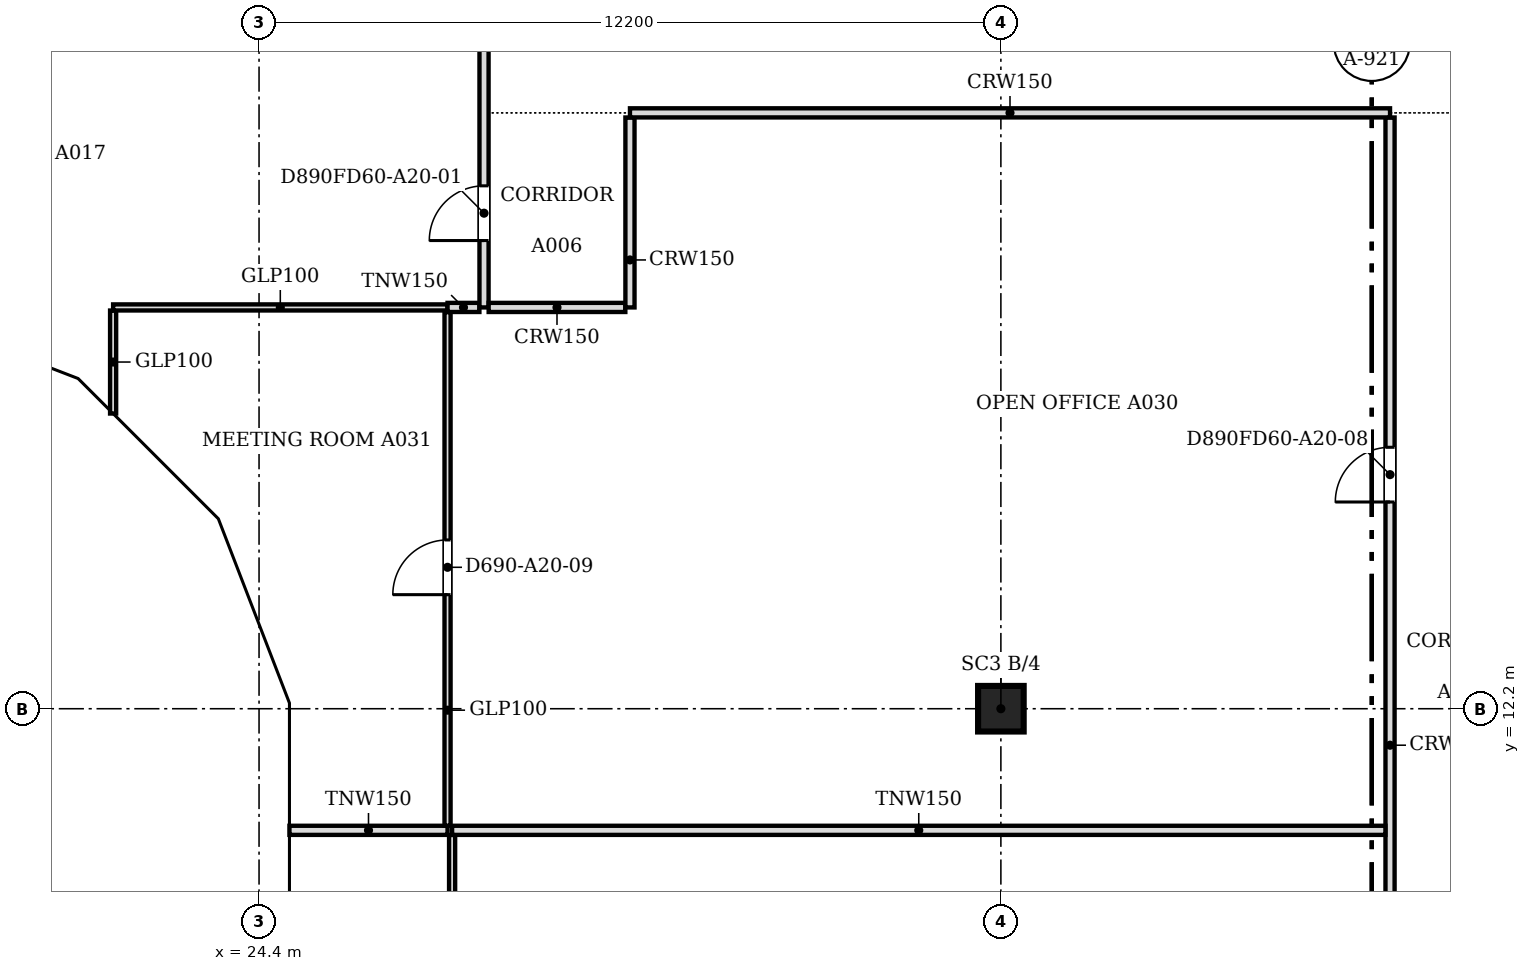
"""IFC4 building model, lengths in metres.
Left out: names, types, materials, properties, quantities, classifications, styles, units other than length and angle.
Written with IfcOpenShell. Run it as: python <this file> out.ifc"""

import sys

from ifc_helpers import new_model, si_unit, direction, frame, frame_2d, origin, origin_2d, place, context, subcontext, project, spatial, polyline, rectangle, outline, extrude, faceted_brep, source, transform, mapped, element, fill, save


model = new_model("IFC4")
c1 = context("Model", 3, precision=1e-05, world=origin(), true_north=direction((0.0, 1.0)))
c2 = subcontext(c1, "Body", "Model", "MODEL_VIEW")
j1 = project(units=[si_unit("LENGTHUNIT", "METRE"), si_unit("PLANEANGLEUNIT", "RADIAN")], contexts=[c1])
p1 = place(None, origin())
s1 = spatial("IfcSite", under=j1, at=p1, CompositionType="ELEMENT")
p2 = place(p1, origin())
s2 = spatial("IfcBuilding", under=s1, at=p2, CompositionType="ELEMENT")
p3 = place(p2, frame((0.0, 0.0, 228.3)))
s3 = spatial("IfcBuildingStorey", under=s2, at=p3, CompositionType="ELEMENT", Elevation=228.3)
p4 = place(p3, frame((36.6, 12.2, 0.0), z_axis=(0.0, 0.0, 1.0), x_axis=(1.0, 0.0, 0.0)))
e1 = element("IfcColumn", 1, at=p4, inside=s3, PredefinedType="COLUMN", context=c2, shape_type="SweptSolid", body=[
    extrude(rectangle(XDim=0.75, YDim=0.75, at=origin_2d()), origin(), (0.0, 0.0, 1.0), 3.5),
])
m1 = source(origin(), c2, "Body", "Brep", [
    faceted_brep([(0.093, -0.25, 0.056), (3.143, -0.25, 3.736), (3.143, -0.25, 3.864), (0.093, -0.25, 7.544), (0.0, 0.25, 7.543), (0.047, 0.25, 7.6), (3.196, 0.25, 3.8), (0.047, 0.25, 0.0), (0.0, 0.25, 0.057), (3.196, -0.0, 3.8), (0.047, 0.0, 0.0), (0.047, 0.0, 7.6)], [[[0, 1, 2, 3]], [[4, 5, 6, 7, 8]], [[7, 6, 9, 1, 0, 10]], [[6, 5, 11, 3, 2, 9]], [[5, 4, 11]], [[8, 7, 10]], [[8, 10, 0, 3, 11, 4]], [[1, 9, 2]]]),
])
p5 = place(p3, frame((18.303, 18.567, -3.8), z_axis=(0.0, 0.0, 1.0), x_axis=(0.932978940178, -0.359930961693, 0.0)))
e2 = element("IfcWall", 2, at=p5, inside=s3, PredefinedType="SOLIDWALL", context=c2, shape_type="MappedRepresentation", body=[
    mapped(m1, transform((0.0, 0.0, 0.0), scale=1.0)),
])
m2 = source(origin(), c2, "Body", "SweptSolid", [
    extrude(outline(polyline([(0.247, 0.633), (2.871, 3.8), (0.247, 6.967), (0.247, 0.633)])), frame((0.0, 0.26, 0.0), z_axis=(0.0, -1.0, 0.0), x_axis=(1.0, 0.0, 0.0)), (0.0, 0.0, 1.0), 0.52),
])
p6 = place(p5, origin())
e3 = element("IfcOpeningElement", 3, at=p6, cuts=e2, PredefinedType="OPENING", context=c2, shape_type="MappedRepresentation", body=[
    mapped(m2, transform((0.0, 0.0, 0.0), scale=1.0)),
])
m3 = source(origin(), c2, "Body", "Brep", [
    faceted_brep([(3.103, -0.25, 7.536), (0.053, -0.25, 3.864), (0.053, -0.25, 3.736), (3.103, -0.25, 0.064), (0.0, 0.25, 3.8), (3.156, 0.25, 7.6), (3.209, 0.25, 7.536), (3.209, 0.25, 0.064), (3.156, 0.25, 0.0), (3.156, -0.0, 0.0), (3.156, -0.0, 7.6), (0.0, 0.0, 3.8)], [[[0, 1, 2, 3]], [[4, 5, 6, 7, 8]], [[8, 7, 9]], [[6, 5, 10]], [[5, 4, 11, 1, 0, 10]], [[4, 8, 9, 3, 2, 11]], [[11, 2, 1]], [[3, 9, 7, 6, 10, 0]]]),
])
p7 = place(p3, frame((21.285, 17.417, -3.8), z_axis=(0.0, 0.0, 1.0), x_axis=(0.707106781187, -0.707106781187, 0.0)))
e4 = element("IfcWall", 4, at=p7, inside=s3, PredefinedType="SOLIDWALL", context=c2, shape_type="MappedRepresentation", body=[
    mapped(m3, transform((0.0, 0.0, 0.0), scale=1.0)),
])
m4 = source(origin(), c2, "Body", "SweptSolid", [
    extrude(outline(polyline([(2.956, 6.968), (0.325, 3.8), (2.956, 0.632), (2.956, 6.968)])), frame((0.0, 0.26, 0.0), z_axis=(0.0, -1.0, 0.0), x_axis=(1.0, 0.0, 0.0)), (0.0, 0.0, 1.0), 0.52),
])
p8 = place(p7, origin())
e5 = element("IfcOpeningElement", 5, at=p8, cuts=e4, PredefinedType="OPENING", context=c2, shape_type="MappedRepresentation", body=[
    mapped(m4, transform((0.0, 0.0, 0.0), scale=1.0)),
])
m5 = source(origin(), c2, "Body", "Brep", [
    faceted_brep([(0.106, -0.25, 0.064), (3.156, -0.25, 3.744), (3.156, -0.25, 3.856), (0.106, -0.25, 7.536), (0.0, 0.25, 7.536), (0.053, 0.25, 7.6), (3.202, 0.25, 3.8), (0.053, 0.25, 0.0), (0.0, 0.25, 0.064), (3.202, -0.0, 3.8), (0.053, 0.0, 0.0), (0.053, 0.0, 7.6)], [[[0, 1, 2, 3]], [[4, 5, 6, 7, 8]], [[7, 6, 9, 1, 0, 10]], [[6, 5, 11, 3, 2, 9]], [[5, 4, 11]], [[8, 7, 10]], [[8, 10, 0, 3, 11, 4]], [[1, 9, 2]]]),
])
p9 = place(p3, frame((23.497, 15.234, -3.8), z_axis=(0.0, 0.0, 1.0), x_axis=(0.359913782069, -0.932985567668, 0.0)))
e6 = element("IfcWall", 6, at=p9, inside=s3, PredefinedType="SOLIDWALL", context=c2, shape_type="MappedRepresentation", body=[
    mapped(m5, transform((0.0, 0.0, 0.0), scale=1.0)),
])
m6 = source(origin(), c2, "Body", "SweptSolid", [
    extrude(outline(polyline([(0.253, 0.633), (2.878, 3.8), (0.253, 6.967), (0.253, 0.633)])), frame((0.0, 0.26, 0.0), z_axis=(0.0, -1.0, 0.0), x_axis=(1.0, 0.0, 0.0)), (0.0, 0.0, 1.0), 0.52),
])
p10 = place(p9, origin())
e7 = element("IfcOpeningElement", 7, at=p10, cuts=e6, PredefinedType="OPENING", context=c2, shape_type="MappedRepresentation", body=[
    mapped(m6, transform((0.0, 0.0, 0.0), scale=1.0)),
])
m7 = source(origin(), c2, "Body", "Brep", [
    faceted_brep([(3.096, -0.25, 0.0), (6.1, -0.25, 3.8), (3.096, -0.25, 7.6), (0.047, -0.25, 3.857), (0.047, -0.25, 3.743), (0.0, 0.25, 3.8), (3.096, 0.25, 7.6), (6.053, 0.25, 3.859), (6.053, 0.25, 3.741), (3.096, 0.25, 0.0), (6.1, -0.0, 3.8), (0.0, 0.0, 3.8)], [[[0, 1, 2, 3, 4]], [[5, 6, 7, 8, 9]], [[9, 8, 10, 1, 0]], [[7, 6, 2, 1, 10]], [[6, 5, 11, 3, 2]], [[5, 9, 0, 4, 11]], [[11, 4, 3]], [[10, 8, 7]]]),
])
p11 = place(p3, frame((24.65, 12.247, -3.8), z_axis=(0.0, 0.0, 1.0), x_axis=(0.0, -1.0, 0.0)))
e8 = element("IfcWall", 8, at=p11, inside=s3, PredefinedType="SOLIDWALL", context=c2, shape_type="MappedRepresentation", body=[
    mapped(m7, transform((0.0, 0.0, 0.0), scale=1.0)),
])
m8 = source(origin(), c2, "Body", "SweptSolid", [
    extrude(outline(polyline([(3.094, 0.399), (5.781, 3.8), (3.094, 7.201), (0.323, 3.8), (3.094, 0.399)])), frame((0.0, 0.26, 0.0), z_axis=(0.0, -1.0, 0.0), x_axis=(1.0, 0.0, 0.0)), (0.0, 0.0, 1.0), 0.52),
])
p12 = place(p11, origin())
e9 = element("IfcOpeningElement", 9, at=p12, cuts=e8, PredefinedType="OPENING", context=c2, shape_type="MappedRepresentation", body=[
    mapped(m8, transform((0.0, 0.0, 0.0), scale=1.0)),
])
m9 = source(origin(), c2, "Body", "Brep", [
    faceted_brep([(3.096, -0.25, 3.8), (0.047, -0.25, 3.8), (0.047, -0.25, 3.744), (3.096, -0.25, 0.064), (0.0, 0.25, 3.8), (3.202, 0.25, 3.8), (3.202, 0.25, 0.064), (3.149, 0.25, 0.0), (3.149, -0.0, 0.0), (0.0, 0.0, 3.8)], [[[0, 1, 2, 3]], [[4, 5, 6, 7]], [[7, 6, 8]], [[5, 4, 9, 1, 0]], [[4, 7, 8, 3, 2, 9]], [[2, 1, 9]], [[3, 8, 6, 5, 0]]]),
])
p13 = place(p3, frame((18.346, 18.55, 0.0), z_axis=(0.0, 0.0, 1.0), x_axis=(0.932985567668, -0.359913782069, 0.0)))
e10 = element("IfcWall", 10, at=p13, inside=s3, PredefinedType="SOLIDWALL", context=c2, shape_type="MappedRepresentation", body=[
    mapped(m9, transform((0.0, 0.0, 0.0), scale=1.0)),
])
m10 = source(origin(), c2, "Body", "SweptSolid", [
    extrude(outline(polyline([(2.949, 3.55), (0.532, 3.55), (2.949, 0.633), (2.949, 3.55)])), frame((0.0, 0.26, 0.0), z_axis=(0.0, -1.0, 0.0), x_axis=(1.0, 0.0, 0.0)), (0.0, 0.0, 1.0), 0.52),
])
p14 = place(p13, origin())
e11 = element("IfcOpeningElement", 11, at=p14, cuts=e10, PredefinedType="OPENING", context=c2, shape_type="MappedRepresentation", body=[
    mapped(m10, transform((0.0, 0.0, 0.0), scale=1.0)),
])
m11 = source(origin(), c2, "Body", "Brep", [
    faceted_brep([(0.106, -0.25, 0.064), (3.156, -0.25, 3.736), (3.156, -0.25, 3.8), (0.106, -0.25, 3.8), (0.0, 0.25, 3.8), (3.209, 0.25, 3.8), (0.053, 0.25, 0.0), (0.0, 0.25, 0.064), (3.209, -0.0, 3.8), (0.053, 0.0, 0.0)], [[[0, 1, 2, 3]], [[4, 5, 6, 7]], [[6, 5, 8, 1, 0, 9]], [[5, 4, 3, 2, 8]], [[7, 6, 9]], [[7, 9, 0, 3, 4]], [[1, 8, 2]]]),
])
p15 = place(p3, frame((21.248, 17.454, 0.0), z_axis=(0.0, 0.0, 1.0), x_axis=(0.707106781187, -0.707106781187, 0.0)))
e12 = element("IfcWall", 12, at=p15, inside=s3, PredefinedType="SOLIDWALL", context=c2, shape_type="MappedRepresentation", body=[
    mapped(m11, transform((0.0, 0.0, 0.0), scale=1.0)),
])
m12 = source(origin(), c2, "Body", "SweptSolid", [
    extrude(outline(polyline([(0.253, 0.632), (2.676, 3.55), (0.253, 3.55), (0.253, 0.632)])), frame((0.0, 0.26, 0.0), z_axis=(0.0, -1.0, 0.0), x_axis=(1.0, 0.0, 0.0)), (0.0, 0.0, 1.0), 0.52),
])
p16 = place(p15, origin())
e13 = element("IfcOpeningElement", 13, at=p16, cuts=e12, PredefinedType="OPENING", context=c2, shape_type="MappedRepresentation", body=[
    mapped(m12, transform((0.0, 0.0, 0.0), scale=1.0)),
])
m13 = source(origin(), c2, "Body", "Brep", [
    faceted_brep([(3.103, -0.25, 3.8), (0.053, -0.25, 3.8), (0.053, -0.25, 3.736), (3.103, -0.25, 0.056), (0.0, 0.25, 3.8), (3.196, 0.25, 3.8), (3.196, 0.25, 0.057), (3.149, 0.25, 0.0), (3.149, -0.0, 0.0), (0.0, 0.0, 3.8)], [[[0, 1, 2, 3]], [[4, 5, 6, 7]], [[7, 6, 8]], [[5, 4, 9, 1, 0]], [[4, 7, 8, 3, 2, 9]], [[2, 1, 9]], [[3, 8, 6, 5, 0]]]),
])
p17 = place(p3, frame((23.517, 15.185, 0.0), z_axis=(0.0, 0.0, 1.0), x_axis=(0.359864468756, -0.933004589553, 0.0)))
e14 = element("IfcWall", 14, at=p17, inside=s3, PredefinedType="SOLIDWALL", context=c2, shape_type="MappedRepresentation", body=[
    mapped(m13, transform((0.0, 0.0, 0.0), scale=1.0)),
])
p18 = place(p17, origin())
e15 = element("IfcOpeningElement", 15, at=p18, cuts=e14, PredefinedType="OPENING", context=c2, shape_type="MappedRepresentation", body=[
    mapped(m10, transform((0.0, 0.0, 0.0), scale=1.0)),
])
m14 = source(origin(), c2, "Body", "Brep", [
    faceted_brep([(0.093, -0.25, 0.057), (3.143, -0.25, 3.8), (0.093, -0.25, 3.8), (0.0, 0.25, 3.8), (3.143, 0.25, 3.8), (0.047, 0.25, 0.0), (0.0, 0.25, 0.056), (0.047, 0.0, 0.0)], [[[0, 1, 2]], [[3, 4, 5, 6]], [[5, 4, 1, 0, 7]], [[4, 3, 2, 1]], [[6, 5, 7]], [[6, 7, 0, 2, 3]]]),
])
p19 = place(p3, frame((24.65, 12.293, 0.0), z_axis=(0.0, 0.0, 1.0), x_axis=(0.0, -1.0, 0.0)))
e16 = element("IfcWall", 16, at=p19, inside=s3, PredefinedType="SOLIDWALL", context=c2, shape_type="MappedRepresentation", body=[
    mapped(m14, transform((0.0, 0.0, 0.0), scale=1.0)),
])
m15 = source(origin(), c2, "Body", "SweptSolid", [
    extrude(outline(polyline([(0.247, 0.641), (2.617, 3.55), (0.247, 3.55), (0.247, 0.641)])), frame((0.0, 0.26, 0.0), z_axis=(0.0, -1.0, 0.0), x_axis=(1.0, 0.0, 0.0)), (0.0, 0.0, 1.0), 0.52),
])
p20 = place(p19, origin())
e17 = element("IfcOpeningElement", 17, at=p20, cuts=e16, PredefinedType="OPENING", context=c2, shape_type="MappedRepresentation", body=[
    mapped(m15, transform((0.0, 0.0, 0.0), scale=1.0)),
])
p21 = place(p3, frame((43.0, 0.5, 0.0), z_axis=(0.0, 0.0, 1.0), x_axis=(0.0, 1.0, 0.0)))
e18 = element("IfcWall", 18, at=p21, inside=s3, PredefinedType="PARTITIONING", context=c2, shape_type="SweptSolid", body=[
    extrude(rectangle(XDim=21.424, YDim=0.15, at=frame_2d((10.712, 0.0))), origin(), (0.0, 0.0, 1.0), 2.888),
])
m16 = source(origin(), c2, "Body", "SweptSolid", [
    extrude(rectangle(XDim=0.9, YDim=2.1, at=frame_2d((0.45, 1.05))), frame((0.0, 0.085, 0.0), z_axis=(0.0, -1.0, 0.0), x_axis=(1.0, 0.0, 0.0)), (0.0, 0.0, 1.0), 0.17),
])
p22 = place(p21, frame((6.2, 0.0, 0.0)))
e19 = element("IfcOpeningElement", 19, at=p22, cuts=e18, PredefinedType="OPENING", context=c2, shape_type="MappedRepresentation", body=[
    mapped(m16, transform((0.0, 0.0, 0.0), scale=1.0)),
])
p23 = place(p21, frame((15.1, 0.0, 0.0)))
e20 = element("IfcOpeningElement", 20, at=p23, cuts=e18, PredefinedType="OPENING", context=c2, shape_type="MappedRepresentation", body=[
    mapped(m16, transform((0.0, 0.0, 0.0), scale=1.0)),
])
p24 = place(p3, frame((27.575, 4.2, 0.0), z_axis=(0.0, 0.0, 1.0), x_axis=(0.0, 1.0, 0.0)))
e21 = element("IfcWall", 21, at=p24, inside=s3, PredefinedType="PARTITIONING", context=c2, shape_type="SweptSolid", body=[
    extrude(rectangle(XDim=5.924, YDim=0.1, at=frame_2d((2.962, 0.0))), origin(), (0.0, 0.0, 1.0), 2.888),
])
m17 = source(origin(), c2, "Body", "SweptSolid", [
    extrude(rectangle(XDim=0.9, YDim=2.1, at=frame_2d((0.45, 1.05))), frame((0.0, 0.06, 0.0), z_axis=(0.0, -1.0, 0.0), x_axis=(1.0, 0.0, 0.0)), (0.0, 0.0, 1.0), 0.12),
])
p25 = place(p24, frame((2.5, 0.0, 0.0)))
e22 = element("IfcOpeningElement", 22, at=p25, cuts=e21, PredefinedType="OPENING", context=c2, shape_type="MappedRepresentation", body=[
    mapped(m17, transform((0.0, 0.0, 0.0), scale=1.0)),
])
p26 = place(p3, frame((24.9, 10.2, 0.0), z_axis=(0.0, 0.0, 1.0), x_axis=(1.0, 0.0, 0.0)))
e23 = element("IfcWall", 23, at=p26, inside=s3, PredefinedType="PARTITIONING", context=c2, shape_type="SweptSolid", body=[
    extrude(rectangle(XDim=2.6, YDim=0.15, at=frame_2d((1.3, 0.0))), origin(), (0.0, 0.0, 1.0), 2.888),
])
p27 = place(p3, frame((27.575, 10.2, 0.0), z_axis=(0.0, 0.0, 1.0), x_axis=(1.0, 0.0, 0.0)))
e24 = element("IfcWall", 24, at=p27, inside=s3, PredefinedType="PARTITIONING", context=c2, shape_type="SweptSolid", body=[
    extrude(rectangle(XDim=15.349, YDim=0.15, at=frame_2d((7.675, 0.0))), origin(), (0.0, 0.0, 1.0), 2.888),
])
p28 = place(p3, frame((27.5, 10.276, 0.0), z_axis=(0.0, 0.0, 1.0), x_axis=(0.0, 1.0, 0.0)))
e25 = element("IfcWall", 25, at=p28, inside=s3, PredefinedType="PARTITIONING", context=c2, shape_type="SweptSolid", body=[
    extrude(rectangle(XDim=8.448, YDim=0.1, at=frame_2d((4.224, 0.0))), origin(), (0.0, 0.0, 1.0), 2.888),
])
p29 = place(p28, frame((3.8, 0.0, 0.0)))
e26 = element("IfcOpeningElement", 26, at=p29, cuts=e25, PredefinedType="OPENING", context=c2, shape_type="MappedRepresentation", body=[
    mapped(m17, transform((0.0, 0.0, 0.0), scale=1.0)),
])
p30 = place(p3, frame((22.0, 17.055, 0.0), z_axis=(0.0, 0.0, 1.0), x_axis=(0.0, 1.0, 0.0)))
e27 = element("IfcWall", 27, at=p30, inside=s3, PredefinedType="PARTITIONING", context=c2, shape_type="SweptSolid", body=[
    extrude(rectangle(XDim=1.694, YDim=0.1, at=frame_2d((0.847, 0.0))), origin(), (0.0, 0.0, 1.0), 2.888),
])
p31 = place(p3, frame((22.0, 18.8, 0.0), z_axis=(0.0, 0.0, 1.0), x_axis=(1.0, 0.0, 0.0)))
e28 = element("IfcWall", 28, at=p31, inside=s3, PredefinedType="PARTITIONING", context=c2, shape_type="SweptSolid", body=[
    extrude(rectangle(XDim=5.499, YDim=0.1, at=frame_2d((2.75, 0.0))), origin(), (0.0, 0.0, 1.0), 2.888),
])
p32 = place(p3, frame((27.5, 18.8, 0.0), z_axis=(0.0, 0.0, 1.0), x_axis=(1.0, 0.0, 0.0)))
e29 = element("IfcWall", 29, at=p32, inside=s3, PredefinedType="PARTITIONING", context=c2, shape_type="SweptSolid", body=[
    extrude(rectangle(XDim=0.524, YDim=0.15, at=frame_2d((0.262, 0.0))), origin(), (0.0, 0.0, 1.0), 2.888),
])
p33 = place(p3, frame((28.1, 18.8, 0.0), z_axis=(0.0, 0.0, 1.0), x_axis=(0.0, 1.0, 0.0)))
e30 = element("IfcWall", 30, at=p33, inside=s3, PredefinedType="PARTITIONING", context=c2, shape_type="SweptSolid", body=[
    extrude(rectangle(XDim=26.424, YDim=0.15, at=frame_2d((13.212, 0.0))), origin(), (0.0, 0.0, 1.0), 2.888),
])
p34 = place(p33, frame((1.1, 0.0, 0.0)))
e31 = element("IfcOpeningElement", 31, at=p34, cuts=e30, PredefinedType="OPENING", context=c2, shape_type="MappedRepresentation", body=[
    mapped(m16, transform((0.0, 0.0, 0.0), scale=1.0)),
])
p35 = place(p33, frame((23.151, 0.0, 0.0)))
e32 = element("IfcOpeningElement", 32, at=p35, cuts=e30, PredefinedType="OPENING", context=c2, shape_type="MappedRepresentation", body=[
    mapped(m16, transform((0.0, 0.0, 0.0), scale=1.0)),
])
p36 = place(p33, frame((8.2, 0.0, 0.0)))
e33 = element("IfcOpeningElement", 33, at=p36, cuts=e30, PredefinedType="OPENING", context=c2, shape_type="MappedRepresentation", body=[
    mapped(m16, transform((0.0, 0.0, 0.0), scale=1.0)),
])
p37 = place(p33, frame((15.8, 0.0, 0.0)))
e34 = element("IfcOpeningElement", 34, at=p37, cuts=e30, PredefinedType="OPENING", context=c2, shape_type="MappedRepresentation", body=[
    mapped(m16, transform((0.0, 0.0, 0.0), scale=1.0)),
])
p38 = place(p3, frame((28.176, 18.8, 0.0), z_axis=(0.0, 0.0, 1.0), x_axis=(1.0, 0.0, 0.0)))
e35 = element("IfcWall", 35, at=p38, inside=s3, PredefinedType="PARTITIONING", context=c2, shape_type="SweptSolid", body=[
    extrude(rectangle(XDim=2.248, YDim=0.15, at=frame_2d((1.124, 0.0))), origin(), (0.0, 0.0, 1.0), 2.888),
])
p39 = place(p3, frame((30.5, 18.8, 0.0), z_axis=(0.0, 0.0, 1.0), x_axis=(0.0, 1.0, 0.0)))
e36 = element("IfcWall", 36, at=p39, inside=s3, PredefinedType="PARTITIONING", context=c2, shape_type="SweptSolid", body=[
    extrude(rectangle(XDim=3.124, YDim=0.15, at=frame_2d((1.562, 0.0))), origin(), (0.0, 0.0, 1.0), 2.888),
])
p40 = place(p3, frame((30.5, 22.0, 0.0), z_axis=(0.0, 0.0, 1.0), x_axis=(1.0, 0.0, 0.0)))
e37 = element("IfcWall", 37, at=p40, inside=s3, PredefinedType="PARTITIONING", context=c2, shape_type="SweptSolid", body=[
    extrude(rectangle(XDim=12.5, YDim=0.15, at=frame_2d((6.25, 0.0))), origin(), (0.0, 0.0, 1.0), 2.888),
])
m18 = source(origin(), c2, "Body", "SweptSolid", [
    extrude(rectangle(XDim=0.9, YDim=2.1, at=frame_2d((0.45, 1.05))), frame((0.0, 0.025, 0.0), z_axis=(0.0, -1.0, 0.0), x_axis=(1.0, 0.0, 0.0)), (0.0, 0.0, 1.0), 0.05),
])
p41 = place(p34, origin())
e38 = element("IfcDoor", 38, at=p41, inside=s3, OperationType="SINGLE_SWING_LEFT", PredefinedType="DOOR", context=c2, shape_type="MappedRepresentation", body=[
    mapped(m18, transform((0.0, 0.0, 0.0), scale=1.0)),
])
fill(e31, e38)
p42 = place(p29, origin())
e39 = element("IfcDoor", 39, at=p42, inside=s3, OperationType="SINGLE_SWING_LEFT", PredefinedType="DOOR", context=c2, shape_type="MappedRepresentation", body=[
    mapped(m18, transform((0.0, 0.0, 0.0), scale=1.0)),
])
fill(e26, e39)
p43 = place(p23, origin())
e40 = element("IfcDoor", 40, at=p43, inside=s3, OperationType="SINGLE_SWING_LEFT", PredefinedType="DOOR", context=c2, shape_type="MappedRepresentation", body=[
    mapped(m18, transform((0.0, 0.0, 0.0), scale=1.0)),
])
fill(e20, e40)
save(model, sys.argv[1])
